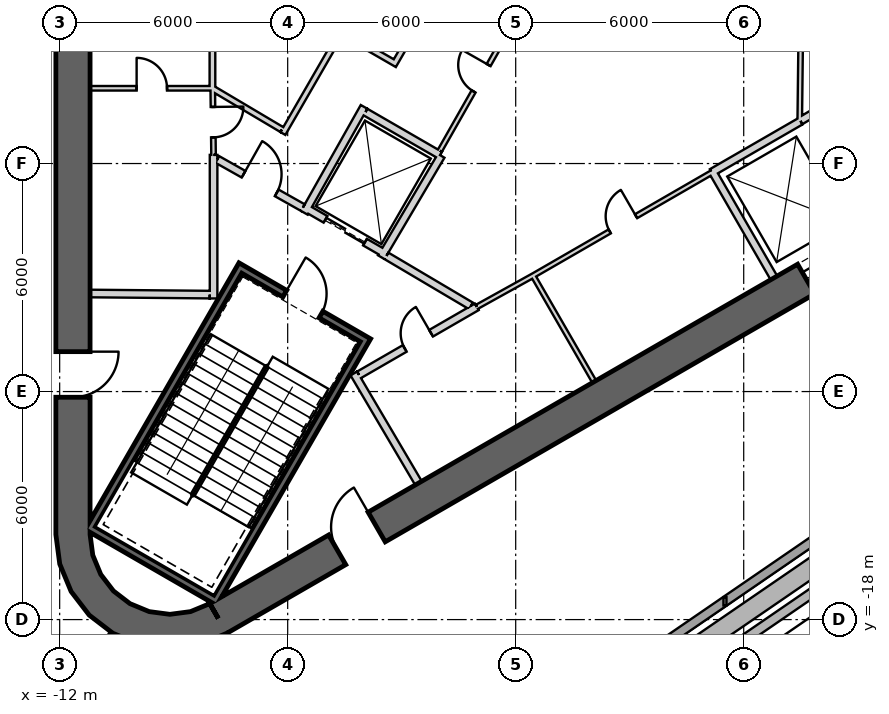
"""IFC4 building model, lengths in metres.
Left out: names, types, materials, properties, quantities, classifications, styles, units other than length and angle.
Written with IfcOpenShell. Run it as: python <this file> out.ifc"""

import sys

from ifc_helpers import new_model, si_unit, direction, frame, frame_2d, origin, place, context, subcontext, project, spatial, polyline, rectangle, outline, extrude, element, fill, save


model = new_model("IFC4")
c1 = context("Model", 3, precision=1e-05, world=origin(), true_north=direction((0.0, 1.0)))
c2 = subcontext(c1, "Body", "Model", "MODEL_VIEW")
j1 = project(units=[si_unit("LENGTHUNIT", "METRE"), si_unit("PLANEANGLEUNIT", "RADIAN")], contexts=[c1])
p1 = place(None, origin())
s1 = spatial("IfcSite", under=j1, at=p1, CompositionType="ELEMENT")
p2 = place(p1, origin())
s2 = spatial("IfcBuilding", under=s1, at=p2, CompositionType="ELEMENT")
p3 = place(p2, frame((0.0, 0.0, 415.3)))
s3 = spatial("IfcBuildingStorey", under=s2, at=p3, CompositionType="ELEMENT", Elevation=415.3)
p4 = place(p3, frame((-11.65, 15.762, 0.0), z_axis=(0.0, 0.0, 1.0), x_axis=(0.0, -1.0, 0.0)))
e1 = element("IfcWall", 1, at=p4, inside=s3, PredefinedType="SHEAR", context=c2, shape_type="SweptSolid", body=[
    extrude(rectangle(XDim=31.523, YDim=0.9, at=frame_2d((15.762, 0.0))), origin(), (0.0, 0.0, 1.0), 5.0),
])
p5 = place(p4, frame((3.612, 0.0, 0.0)))
e2 = element("IfcOpeningElement", 2, at=p5, cuts=e1, PredefinedType="OPENING", context=c2, shape_type="SweptSolid", body=[
    extrude(rectangle(XDim=1.2, YDim=2.4, at=frame_2d((0.6, 1.2))), frame((0.0, 0.46, 0.0), z_axis=(0.0, -1.0, 0.0), x_axis=(1.0, 0.0, 0.0)), (0.0, 0.0, 1.0), 0.92),
])
p6 = place(p4, frame((26.712, 0.0, 0.0)))
e3 = element("IfcOpeningElement", 3, at=p6, cuts=e1, PredefinedType="OPENING", context=c2, shape_type="SweptSolid", body=[
    extrude(rectangle(XDim=1.2, YDim=2.4, at=frame_2d((0.6, 1.2))), frame((0.0, 0.46, 0.0), z_axis=(0.0, -1.0, 0.0), x_axis=(1.0, 0.0, 0.0)), (0.0, 0.0, 1.0), 0.92),
])
p7 = place(p3, frame((-7.825, -17.97, 0.0), z_axis=(0.0, 0.0, 1.0), x_axis=(0.866028369851, 0.499994862586, 0.0)))
e4 = element("IfcWall", 4, at=p7, inside=s3, PredefinedType="SHEAR", context=c2, shape_type="SweptSolid", body=[
    extrude(rectangle(XDim=31.523, YDim=0.9, at=frame_2d((15.762, 0.0))), origin(), (0.0, 0.0, 1.0), 5.0),
])
p8 = place(p7, frame((17.862, 0.0, 0.0)))
e5 = element("IfcOpeningElement", 5, at=p8, cuts=e4, PredefinedType="OPENING", context=c2, shape_type="SweptSolid", body=[
    extrude(rectangle(XDim=1.2, YDim=2.4, at=frame_2d((0.6, 1.2))), frame((0.0, 0.46, 0.0), z_axis=(0.0, -1.0, 0.0), x_axis=(1.0, 0.0, 0.0)), (0.0, 0.0, 1.0), 0.92),
])
p9 = place(p7, frame((20.562, 0.0, 0.0)))
e6 = element("IfcOpeningElement", 6, at=p9, cuts=e4, PredefinedType="OPENING", context=c2, shape_type="SweptSolid", body=[
    extrude(rectangle(XDim=1.2, YDim=2.4, at=frame_2d((0.6, 1.2))), frame((0.0, 0.46, 0.0), z_axis=(0.0, -1.0, 0.0), x_axis=(1.0, 0.0, 0.0)), (0.0, 0.0, 1.0), 0.92),
])
p10 = place(p7, frame((26.712, 0.0, 0.0)))
e7 = element("IfcOpeningElement", 7, at=p10, cuts=e4, PredefinedType="OPENING", context=c2, shape_type="SweptSolid", body=[
    extrude(rectangle(XDim=1.2, YDim=2.4, at=frame_2d((0.6, 1.2))), frame((0.0, 0.46, 0.0), z_axis=(0.0, -1.0, 0.0), x_axis=(1.0, 0.0, 0.0)), (0.0, 0.0, 1.0), 0.92),
])
p11 = place(p7, frame((3.612, 0.0, 0.0)))
e8 = element("IfcOpeningElement", 8, at=p11, cuts=e4, PredefinedType="OPENING", context=c2, shape_type="SweptSolid", body=[
    extrude(rectangle(XDim=1.2, YDim=2.4, at=frame_2d((0.6, 1.2))), frame((0.0, 0.46, 0.0), z_axis=(0.0, -1.0, 0.0), x_axis=(1.0, 0.0, 0.0)), (0.0, 0.0, 1.0), 0.92),
])
p12 = place(p3, origin())
e9 = element("IfcWall", 9, at=p12, inside=s3, PredefinedType="SHEAR", context=c2, shape_type="SweptSolid", body=[
    extrude(outline(polyline([(-12.1, -15.762), (-11.998, -16.538), (-11.698, -17.262), (-11.221, -17.883), (-10.6, -18.36), (-9.876, -18.659), (-9.1, -18.762), (-8.323, -18.659), (-7.6, -18.36), (-8.05, -17.58), (-8.556, -17.79), (-9.1, -17.862), (-9.644, -17.79), (-10.15, -17.58), (-10.585, -17.247), (-10.919, -16.812), (-11.128, -16.305), (-11.2, -15.762), (-12.1, -15.762)])), origin(), (0.0, 0.0, 1.0), 5.0),
])
p13 = place(p3, frame((-1.098, -22.052, 0.0), z_axis=(0.0, 0.0, 1.0), x_axis=(0.824476827337, 0.565895715821, 0.0)))
e10 = element("IfcWall", 10, at=p13, inside=s3, PredefinedType="SOLIDWALL", context=c2, shape_type="SweptSolid", body=[
    extrude(rectangle(XDim=24.031, YDim=0.24, at=frame_2d((12.016, 0.0))), origin(), (0.0, 0.0, 1.0), 4.75),
])
p14 = place(p3, frame((20.109, -8.849, 0.04), z_axis=(0.0, 0.0, 1.0), x_axis=(-0.824476642241, -0.565895985494, 0.0)))
e11 = element("IfcWall", 11, at=p14, inside=s3, PredefinedType="PARAPET", context=c2, shape_type="SweptSolid", body=[
    extrude(rectangle(XDim=26.04, YDim=0.25, at=frame_2d((13.02, 0.0))), origin(), (0.0, 0.0, 1.0), 1.2),
])
p15 = place(p3, frame((19.357, -8.698, 0.04), z_axis=(0.0, 0.0, 1.0), x_axis=(-0.824477152259, -0.565895242428, 0.0)))
e12 = element("IfcWall", 12, at=p15, inside=s3, PredefinedType="PARAPET", context=c2, shape_type="SweptSolid", body=[
    extrude(rectangle(XDim=24.864, YDim=0.5, at=frame_2d((12.432, 0.0))), origin(), (0.0, 0.0, 1.0), 0.6),
])
p16 = place(p3, frame((6.795, -9.01, 0.0), z_axis=(0.0, 0.0, 1.0), x_axis=(-0.499984717929, 0.866034226713, 0.0)))
e13 = element("IfcWall", 13, at=p16, inside=s3, PredefinedType="PLUMBINGWALL", context=c2, shape_type="SweptSolid", body=[
    extrude(rectangle(XDim=3.25, YDim=0.2, at=frame_2d((1.625, 0.0))), origin(), (0.0, 0.0, 1.0), 4.75),
])
p17 = place(p3, frame((5.159, -6.236, 0.0), z_axis=(0.0, 0.0, 1.0), x_axis=(0.866036505625, 0.499980770555, 0.0)))
e14 = element("IfcWall", 14, at=p17, inside=s3, PredefinedType="PLUMBINGWALL", context=c2, shape_type="SweptSolid", body=[
    extrude(rectangle(XDim=2.7, YDim=0.2, at=frame_2d((1.35, 0.0))), origin(), (0.0, 0.0, 1.0), 4.75),
])
p18 = place(p3, frame((7.493, -4.878, 0.0), z_axis=(0.0, 0.0, 1.0), x_axis=(0.859981807212, 0.510324691999, 0.0)))
e15 = element("IfcWall", 15, at=p18, inside=s3, PredefinedType="PLUMBINGWALL", context=c2, shape_type="SweptSolid", body=[
    extrude(rectangle(XDim=1.845, YDim=0.2, at=frame_2d((0.922, 0.0))), origin(), (0.0, 0.0, 1.0), 4.75),
])
p19 = place(p3, frame((-3.905, -10.563, -0.25), z_axis=(0.0, 0.0, 1.0), x_axis=(-0.500012932018, -0.866017937352, 0.0)))
e16 = element("IfcWall", 16, at=p19, inside=s3, PredefinedType="SHEAR", context=c2, shape_type="SweptSolid", body=[
    extrude(rectangle(XDim=8.1, YDim=0.2, at=frame_2d((4.05, 0.0))), origin(), (0.0, 0.0, 1.0), 5.0),
])
p20 = place(p3, frame((-11.282, -15.541, -0.25), z_axis=(0.0, 0.0, 1.0), x_axis=(0.866000483506, -0.500043160704, 0.0)))
e17 = element("IfcWall", 17, at=p20, inside=s3, PredefinedType="SHEAR", context=c2, shape_type="SweptSolid", body=[
    extrude(rectangle(XDim=3.8, YDim=0.2, at=frame_2d((1.9, 0.0))), origin(), (0.0, 0.0, 1.0), 5.0),
])
p21 = place(p3, frame((-7.196, -8.663, -0.25), z_axis=(0.0, 0.0, 1.0), x_axis=(-0.499997992926, -0.866026562566, 0.0)))
e18 = element("IfcWall", 18, at=p21, inside=s3, PredefinedType="SHEAR", context=c2, shape_type="SweptSolid", body=[
    extrude(rectangle(XDim=7.9, YDim=0.2, at=frame_2d((3.95, 0.0))), origin(), (0.0, 0.0, 1.0), 5.0),
])
p22 = place(p3, frame((-4.041, -10.599, -0.25), z_axis=(0.0, 0.0, 1.0), x_axis=(-0.866047807691, 0.499961193289, 0.0)))
e19 = element("IfcWall", 19, at=p22, inside=s3, PredefinedType="SHEAR", context=c2, shape_type="SweptSolid", body=[
    extrude(rectangle(XDim=3.6, YDim=0.2, at=frame_2d((1.8, 0.0))), origin(), (0.0, 0.0, 1.0), 5.0),
])
p23 = place(p22, frame((1.25, 0.0, 0.25)))
e20 = element("IfcOpeningElement", 20, at=p23, cuts=e19, PredefinedType="OPENING", context=c2, shape_type="SweptSolid", body=[
    extrude(rectangle(XDim=1.1, YDim=2.1, at=frame_2d((0.55, 1.05))), frame((0.0, 0.11, 0.0), z_axis=(0.0, -1.0, 0.0), x_axis=(1.0, 0.0, 0.0)), (0.0, 0.0, 1.0), 0.22),
])
p24 = place(p3, frame((-3.446, -8.368, 0.0), z_axis=(0.0, 0.0, 1.0), x_axis=(-0.866024647952, 0.500001309137, 0.0)))
e21 = element("IfcWall", 21, at=p24, inside=s3, PredefinedType="PLUMBINGWALL", context=c2, shape_type="SweptSolid", body=[
    extrude(rectangle(XDim=2.4, YDim=0.2, at=frame_2d((1.2, 0.0))), origin(), (0.0, 0.0, 1.0), 4.75),
])
p25 = place(p24, frame((0.6, 0.0, 0.0)))
e22 = element("IfcOpeningElement", 22, at=p25, cuts=e21, PredefinedType="OPENING", context=c2, shape_type="SweptSolid", body=[
    extrude(rectangle(XDim=1.2, YDim=2.4, at=frame_2d((0.6, 1.2))), frame((0.0, 0.11, 0.0), z_axis=(0.0, -1.0, 0.0), x_axis=(1.0, 0.0, 0.0)), (0.0, 0.0, 1.0), 0.22),
])
p26 = place(p3, frame((-1.961, -5.796, 0.0), z_axis=(0.0, 0.0, 1.0), x_axis=(-0.508647062354, -0.860975125052, 0.0)))
e23 = element("IfcWall", 23, at=p26, inside=s3, PredefinedType="PLUMBINGWALL", context=c2, shape_type="SweptSolid", body=[
    extrude(rectangle(XDim=3.1, YDim=0.2, at=frame_2d((1.55, 0.0))), origin(), (0.0, 0.0, 1.0), 4.75),
])
p27 = place(p3, frame((-3.99, -4.509, 0.0), z_axis=(0.0, 0.0, 1.0), x_axis=(-0.491358283181, -0.870957540612, 0.0)))
e24 = element("IfcWall", 24, at=p27, inside=s3, PredefinedType="PLUMBINGWALL", context=c2, shape_type="SweptSolid", body=[
    extrude(rectangle(XDim=3.2, YDim=0.2, at=frame_2d((1.6, 0.0))), origin(), (0.0, 0.0, 1.0), 4.75),
])
p28 = place(p3, frame((-3.953, -4.646, 0.0), z_axis=(0.0, 0.0, 1.0), x_axis=(0.866065302921, -0.4999308863, 0.0)))
e25 = element("IfcWall", 25, at=p28, inside=s3, PredefinedType="PLUMBINGWALL", context=c2, shape_type="SweptSolid", body=[
    extrude(rectangle(XDim=2.264, YDim=0.2, at=frame_2d((1.132, 0.0))), origin(), (0.0, 0.0, 1.0), 4.75),
])
p29 = place(p3, frame((-7.95, -9.55, 0.0), z_axis=(0.0, 0.0, 1.0), x_axis=(0.0, 1.0, 0.0)))
e26 = element("IfcWall", 26, at=p29, inside=s3, PredefinedType="PARTITIONING", context=c2, shape_type="SweptSolid", body=[
    extrude(rectangle(XDim=3.778, YDim=0.2, at=frame_2d((1.889, 0.0))), origin(), (0.0, 0.0, 1.0), 4.75),
])
p30 = place(p3, frame((-11.2, -4.02, 0.0), z_axis=(0.0, 0.0, 1.0), x_axis=(1.0, 0.0, 0.0)))
e27 = element("IfcWall", 27, at=p30, inside=s3, PredefinedType="PARTITIONING", context=c2, shape_type="SweptSolid", body=[
    extrude(rectangle(XDim=3.25, YDim=0.12, at=frame_2d((1.625, 0.0))), origin(), (0.0, 0.0, 1.0), 4.75),
])
p31 = place(p30, frame((1.225, 0.0, 0.0)))
e28 = element("IfcOpeningElement", 28, at=p31, cuts=e27, PredefinedType="OPENING", context=c2, shape_type="SweptSolid", body=[
    extrude(rectangle(XDim=0.8, YDim=2.1, at=frame_2d((0.4, 1.05))), frame((0.0, 0.07, 0.0), z_axis=(0.0, -1.0, 0.0), x_axis=(1.0, 0.0, 0.0)), (0.0, 0.0, 1.0), 0.14),
])
p32 = place(p3, frame((-7.98, 1.35, 0.0), z_axis=(0.0, 0.0, 1.0), x_axis=(0.0, -1.0, 0.0)))
e29 = element("IfcWall", 29, at=p32, inside=s3, PredefinedType="PLUMBINGWALL", context=c2, shape_type="SweptSolid", body=[
    extrude(rectangle(XDim=5.4, YDim=0.15, at=frame_2d((2.7, 0.0))), origin(), (0.0, 0.0, 1.0), 4.75),
])
p33 = place(p32, frame((2.3, 0.0, 0.0)))
e30 = element("IfcOpeningElement", 30, at=p33, cuts=e29, PredefinedType="OPENING", context=c2, shape_type="SweptSolid", body=[
    extrude(rectangle(XDim=0.8, YDim=2.1, at=frame_2d((0.4, 1.05))), frame((0.0, 0.085, 0.0), z_axis=(0.0, -1.0, 0.0), x_axis=(1.0, 0.0, 0.0)), (0.0, 0.0, 1.0), 0.17),
])
p34 = place(p3, frame((-11.2, -9.42, 0.0), z_axis=(0.0, 0.0, 1.0), x_axis=(0.999957467379, -0.009222983926, 0.0)))
e31 = element("IfcWall", 31, at=p34, inside=s3, PredefinedType="PARTITIONING", context=c2, shape_type="SweptSolid", body=[
    extrude(rectangle(XDim=3.15, YDim=0.2, at=frame_2d((1.575, 0.0))), origin(), (0.0, 0.0, 1.0), 4.75),
])
p35 = place(p3, frame((-7.951, -5.772, 0.0), z_axis=(0.0, 0.0, 1.0), x_axis=(-0.012047318415, 0.999927428426, 0.0)))
e32 = element("IfcWall", 32, at=p35, inside=s3, PredefinedType="PARTITIONING", context=c2, shape_type="SweptSolid", body=[
    extrude(rectangle(XDim=1.723, YDim=0.12, at=frame_2d((0.861, 0.0))), origin(), (0.0, 0.0, 1.0), 4.75),
])
p36 = place(p35, frame((0.461, 0.0, 0.0)))
e33 = element("IfcOpeningElement", 33, at=p36, cuts=e32, PredefinedType="OPENING", context=c2, shape_type="SweptSolid", body=[
    extrude(rectangle(XDim=0.8, YDim=2.1, at=frame_2d((0.4, 1.05))), frame((0.0, 0.07, 0.0), z_axis=(0.0, -1.0, 0.0), x_axis=(1.0, 0.0, 0.0)), (0.0, 0.0, 1.0), 0.14),
])
p37 = place(p3, frame((2.067, -11.74, 0.0), z_axis=(0.0, 0.0, 1.0), x_axis=(-0.499984717929, 0.866034226713, 0.0)))
e34 = element("IfcWall", 34, at=p37, inside=s3, PredefinedType="PARTITIONING", context=c2, shape_type="SweptSolid", body=[
    extrude(rectangle(XDim=3.25, YDim=0.12, at=frame_2d((1.625, 0.0))), origin(), (0.0, 0.0, 1.0), 4.75),
])
p38 = place(p3, frame((-4.26, -11.524, 0.0), z_axis=(0.0, 0.0, 1.0), x_axis=(0.507997497166, -0.861358544901, 0.0)))
e35 = element("IfcWall", 35, at=p38, inside=s3, PredefinedType="PARTITIONING", context=c2, shape_type="SweptSolid", body=[
    extrude(rectangle(XDim=3.35, YDim=0.2, at=frame_2d((1.675, 0.0))), origin(), (0.0, 0.0, 1.0), 4.75),
])
p39 = place(p3, frame((-1.024, -9.771, 0.0), z_axis=(0.0, 0.0, 1.0), x_axis=(-0.866029903013, -0.499992207027, 0.0)))
e36 = element("IfcWall", 36, at=p39, inside=s3, PredefinedType="PARTITIONING", context=c2, shape_type="SweptSolid", body=[
    extrude(rectangle(XDim=3.578, YDim=0.2, at=frame_2d((1.789, 0.0))), origin(), (0.0, 0.0, 1.0), 4.75),
])
p40 = place(p39, frame((1.389, 0.0, 0.0)))
e37 = element("IfcOpeningElement", 37, at=p40, cuts=e36, PredefinedType="OPENING", context=c2, shape_type="SweptSolid", body=[
    extrude(rectangle(XDim=0.8, YDim=2.1, at=frame_2d((0.4, 1.05))), frame((0.0, 0.11, 0.0), z_axis=(0.0, -1.0, 0.0), x_axis=(1.0, 0.0, 0.0)), (0.0, 0.0, 1.0), 0.22),
])
p41 = place(p3, frame((-1.023, -9.772, 0.0), z_axis=(0.0, 0.0, 1.0), x_axis=(0.874290944206, 0.485402250592, 0.0)))
e38 = element("IfcWall", 38, at=p41, inside=s3, PredefinedType="PARTITIONING", context=c2, shape_type="SweptSolid", body=[
    extrude(rectangle(XDim=1.723, YDim=0.12, at=frame_2d((0.861, 0.0))), origin(), (0.0, 0.0, 1.0), 4.75),
])
p42 = place(p3, frame((0.483, -8.936, 0.0), z_axis=(0.0, 0.0, 1.0), x_axis=(0.866028230842, 0.499995103361, 0.0)))
e39 = element("IfcWall", 39, at=p42, inside=s3, PredefinedType="PARTITIONING", context=c2, shape_type="SweptSolid", body=[
    extrude(rectangle(XDim=5.4, YDim=0.12, at=frame_2d((2.7, 0.0))), origin(), (0.0, 0.0, 1.0), 4.75),
])
p43 = place(p42, frame((2.3, 0.0, 0.0)))
e40 = element("IfcOpeningElement", 40, at=p43, cuts=e39, PredefinedType="OPENING", context=c2, shape_type="SweptSolid", body=[
    extrude(rectangle(XDim=0.8, YDim=2.1, at=frame_2d((0.4, 1.05))), frame((0.0, 0.07, 0.0), z_axis=(0.0, -1.0, 0.0), x_axis=(1.0, 0.0, 0.0)), (0.0, 0.0, 1.0), 0.14),
])
p44 = place(p3, frame((-3.401, -8.43, 0.0), z_axis=(0.0, 0.0, 1.0), x_axis=(0.860630814782, -0.509229418482, 0.0)))
e41 = element("IfcWall", 41, at=p44, inside=s3, PredefinedType="PARTITIONING", context=c2, shape_type="SweptSolid", body=[
    extrude(rectangle(XDim=2.582, YDim=0.2, at=frame_2d((1.291, 0.0))), origin(), (0.0, 0.0, 1.0), 4.75),
])
p45 = place(p3, frame((-7.85, -5.893, 0.0), z_axis=(0.0, 0.0, 1.0), x_axis=(0.871350695252, -0.490660744185, 0.0)))
e42 = element("IfcWall", 42, at=p45, inside=s3, PredefinedType="PARTITIONING", context=c2, shape_type="SweptSolid", body=[
    extrude(rectangle(XDim=2.582, YDim=0.2, at=frame_2d((1.291, 0.0))), origin(), (0.0, 0.0, 1.0), 4.75),
])
p46 = place(p45, frame((0.791, 0.0, 0.0)))
e43 = element("IfcOpeningElement", 43, at=p46, cuts=e42, PredefinedType="OPENING", context=c2, shape_type="SweptSolid", body=[
    extrude(rectangle(XDim=1.0, YDim=2.1, at=frame_2d((0.5, 1.05))), frame((0.0, 0.11, 0.0), z_axis=(0.0, -1.0, 0.0), x_axis=(1.0, 0.0, 0.0)), (0.0, 0.0, 1.0), 0.22),
])
p47 = place(p3, frame((0.224, -1.761, 0.0), z_axis=(0.0, 0.0, 1.0), x_axis=(-0.494327216836, -0.869275907118, 0.0)))
e44 = element("IfcWall", 44, at=p47, inside=s3, PredefinedType="PARTITIONING", context=c2, shape_type="SweptSolid", body=[
    extrude(rectangle(XDim=4.487, YDim=0.12, at=frame_2d((2.244, 0.0))), origin(), (0.0, 0.0, 1.0), 4.75),
])
p48 = place(p47, frame((1.895, 0.0, 0.0)))
e45 = element("IfcOpeningElement", 45, at=p48, cuts=e44, PredefinedType="OPENING", context=c2, shape_type="SweptSolid", body=[
    extrude(rectangle(XDim=0.8, YDim=2.1, at=frame_2d((0.4, 1.05))), frame((0.0, 0.07, 0.0), z_axis=(0.0, -1.0, 0.0), x_axis=(1.0, 0.0, 0.0)), (0.0, 0.0, 1.0), 0.14),
])
p49 = place(p3, frame((7.475, -4.865, 0.0), z_axis=(0.0, 0.0, 1.0), x_axis=(0.011716133148, 0.999931363757, 0.0)))
e46 = element("IfcWall", 46, at=p49, inside=s3, PredefinedType="PARTITIONING", context=c2, shape_type="SweptSolid", body=[
    extrude(rectangle(XDim=2.105, YDim=0.12, at=frame_2d((1.052, 0.0))), origin(), (0.0, 0.0, 1.0), 4.75),
])
p50 = place(p3, frame((-3.219, -3.425, 0.0), z_axis=(0.0, 0.0, 1.0), x_axis=(0.499996236806, 0.866027576455, 0.0)))
e47 = element("IfcWall", 47, at=p50, inside=s3, PredefinedType="PLUMBINGWALL", context=c2, shape_type="SweptSolid", body=[
    extrude(rectangle(XDim=3.036, YDim=0.15, at=frame_2d((1.518, 0.0))), origin(), (0.0, 0.0, 1.0), 4.75),
])
p51 = place(p50, frame((1.156, 0.0, 0.0)))
e48 = element("IfcOpeningElement", 48, at=p51, cuts=e47, PredefinedType="OPENING", context=c2, shape_type="SweptSolid", body=[
    extrude(rectangle(XDim=0.8, YDim=2.1, at=frame_2d((0.4, 1.05))), frame((0.0, 0.085, 0.0), z_axis=(0.0, -1.0, 0.0), x_axis=(1.0, 0.0, 0.0)), (0.0, 0.0, 1.0), 0.17),
])
p52 = place(p3, frame((-4.653, -2.51, 0.0), z_axis=(0.0, 0.0, 1.0), x_axis=(0.866053003207, -0.499952193351, 0.0)))
e49 = element("IfcWall", 49, at=p52, inside=s3, PredefinedType="PLUMBINGWALL", context=c2, shape_type="SweptSolid", body=[
    extrude(rectangle(XDim=1.625, YDim=0.15, at=frame_2d((0.812, 0.0))), origin(), (0.0, 0.0, 1.0), 4.75),
])
p53 = place(p3, frame((-6.126, -5.21, 0.0), z_axis=(0.0, 0.0, 1.0), x_axis=(0.499990139034, 0.866031096941, 0.0)))
e50 = element("IfcWall", 50, at=p53, inside=s3, PredefinedType="PLUMBINGWALL", context=c2, shape_type="SweptSolid", body=[
    extrude(rectangle(XDim=3.0, YDim=0.15, at=frame_2d((1.5, 0.0))), origin(), (0.0, 0.0, 1.0), 4.75),
])
p54 = place(p3, frame((-7.95, -4.041, 0.0), z_axis=(0.0, 0.0, 1.0), x_axis=(0.860090281069, -0.510141851263, 0.0)))
e51 = element("IfcWall", 51, at=p54, inside=s3, PredefinedType="PLUMBINGWALL", context=c2, shape_type="SweptSolid", body=[
    extrude(rectangle(XDim=2.089, YDim=0.15, at=frame_2d((1.045, 0.0))), origin(), (0.0, 0.0, 1.0), 4.75),
])
p55 = place(p3, frame((-10.549, -18.212, 0.0), z_axis=(0.0, 0.0, 1.0), x_axis=(-0.500039923732, -0.86600235258, 0.0)))
e52 = element("IfcWall", 52, at=p55, inside=s3, PredefinedType="PARTITIONING", context=c2, shape_type="SweptSolid", body=[
    extrude(rectangle(XDim=5.015, YDim=0.12, at=frame_2d((2.507, 0.0))), origin(), (0.0, 0.0, 1.0), 2.52),
])
p56 = place(p23, origin())
e53 = element("IfcDoor", 53, at=p56, inside=s3, OperationType="SINGLE_SWING_RIGHT", PredefinedType="USERDEFINED", context=c2, shape_type="SweptSolid", body=[
    extrude(rectangle(XDim=1.1, YDim=2.1, at=frame_2d((0.55, 1.05))), frame((0.0, 0.025, 0.0), z_axis=(0.0, -1.0, 0.0), x_axis=(1.0, 0.0, 0.0)), (0.0, 0.0, 1.0), 0.05),
])
fill(e20, e53)
p57 = place(p46, origin())
e54 = element("IfcDoor", 54, at=p57, inside=s3, OperationType="SINGLE_SWING_LEFT", PredefinedType="USERDEFINED", context=c2, shape_type="SweptSolid", body=[
    extrude(rectangle(XDim=1.0, YDim=2.1, at=frame_2d((0.5, 1.05))), frame((0.0, 0.025, 0.0), z_axis=(0.0, -1.0, 0.0), x_axis=(1.0, 0.0, 0.0)), (0.0, 0.0, 1.0), 0.05),
])
fill(e43, e54)
p58 = place(p25, origin())
e55 = element("IfcDoor", 55, at=p58, inside=s3, OperationType="SLIDING_TO_LEFT", PredefinedType="USERDEFINED", context=c2, shape_type="SweptSolid", body=[
    extrude(rectangle(XDim=1.2, YDim=2.4, at=frame_2d((0.6, 1.2))), frame((0.0, 0.025, 0.0), z_axis=(0.0, -1.0, 0.0), x_axis=(1.0, 0.0, 0.0)), (0.0, 0.0, 1.0), 0.05),
])
fill(e22, e55)
p59 = place(p48, origin())
e56 = element("IfcDoor", 56, at=p59, inside=s3, OperationType="SINGLE_SWING_LEFT", PredefinedType="USERDEFINED", context=c2, shape_type="SweptSolid", body=[
    extrude(rectangle(XDim=0.8, YDim=2.1, at=frame_2d((0.4, 1.05))), frame((0.0, 0.025, 0.0), z_axis=(0.0, -1.0, 0.0), x_axis=(1.0, 0.0, 0.0)), (0.0, 0.0, 1.0), 0.05),
])
fill(e45, e56)
p60 = place(p31, origin())
e57 = element("IfcDoor", 57, at=p60, inside=s3, OperationType="SINGLE_SWING_LEFT", PredefinedType="USERDEFINED", context=c2, shape_type="SweptSolid", body=[
    extrude(rectangle(XDim=0.8, YDim=2.1, at=frame_2d((0.4, 1.05))), frame((0.0, 0.025, 0.0), z_axis=(0.0, -1.0, 0.0), x_axis=(1.0, 0.0, 0.0)), (0.0, 0.0, 1.0), 0.05),
])
fill(e28, e57)
p61 = place(p36, origin())
e58 = element("IfcDoor", 58, at=p61, inside=s3, OperationType="SINGLE_SWING_RIGHT", PredefinedType="USERDEFINED", context=c2, shape_type="SweptSolid", body=[
    extrude(rectangle(XDim=0.8, YDim=2.1, at=frame_2d((0.4, 1.05))), frame((0.0, 0.025, 0.0), z_axis=(0.0, -1.0, 0.0), x_axis=(1.0, 0.0, 0.0)), (0.0, 0.0, 1.0), 0.05),
])
fill(e33, e58)
p62 = place(p40, origin())
e59 = element("IfcDoor", 59, at=p62, inside=s3, OperationType="SINGLE_SWING_LEFT", PredefinedType="USERDEFINED", context=c2, shape_type="SweptSolid", body=[
    extrude(rectangle(XDim=0.8, YDim=2.1, at=frame_2d((0.4, 1.05))), frame((0.0, 0.025, 0.0), z_axis=(0.0, -1.0, 0.0), x_axis=(1.0, 0.0, 0.0)), (0.0, 0.0, 1.0), 0.05),
])
fill(e37, e59)
p63 = place(p43, origin())
e60 = element("IfcDoor", 60, at=p63, inside=s3, OperationType="SINGLE_SWING_RIGHT", PredefinedType="USERDEFINED", context=c2, shape_type="SweptSolid", body=[
    extrude(rectangle(XDim=0.8, YDim=2.1, at=frame_2d((0.4, 1.05))), frame((0.0, 0.025, 0.0), z_axis=(0.0, -1.0, 0.0), x_axis=(1.0, 0.0, 0.0)), (0.0, 0.0, 1.0), 0.05),
])
fill(e40, e60)
p64 = place(p8, origin())
e61 = element("IfcDoor", 61, at=p64, inside=s3, OperationType="SLIDING_TO_LEFT", PredefinedType="USERDEFINED", context=c2, shape_type="SweptSolid", body=[
    extrude(rectangle(XDim=1.2, YDim=2.4, at=frame_2d((0.6, 1.2))), frame((0.0, 0.025, 0.0), z_axis=(0.0, -1.0, 0.0), x_axis=(1.0, 0.0, 0.0)), (0.0, 0.0, 1.0), 0.05),
])
fill(e5, e61)
p65 = place(p6, origin())
e62 = element("IfcDoor", 62, at=p65, inside=s3, OperationType="SINGLE_SWING_LEFT", PredefinedType="USERDEFINED", context=c2, shape_type="SweptSolid", body=[
    extrude(rectangle(XDim=1.2, YDim=2.4, at=frame_2d((0.6, 1.2))), frame((0.0, 0.025, 0.0), z_axis=(0.0, -1.0, 0.0), x_axis=(1.0, 0.0, 0.0)), (0.0, 0.0, 1.0), 0.05),
])
fill(e3, e62)
p66 = place(p11, origin())
e63 = element("IfcDoor", 63, at=p66, inside=s3, OperationType="SINGLE_SWING_RIGHT", PredefinedType="USERDEFINED", context=c2, shape_type="SweptSolid", body=[
    extrude(rectangle(XDim=1.2, YDim=2.4, at=frame_2d((0.6, 1.2))), frame((0.0, 0.025, 0.0), z_axis=(0.0, -1.0, 0.0), x_axis=(1.0, 0.0, 0.0)), (0.0, 0.0, 1.0), 0.05),
])
fill(e8, e63)
save(model, sys.argv[1])
